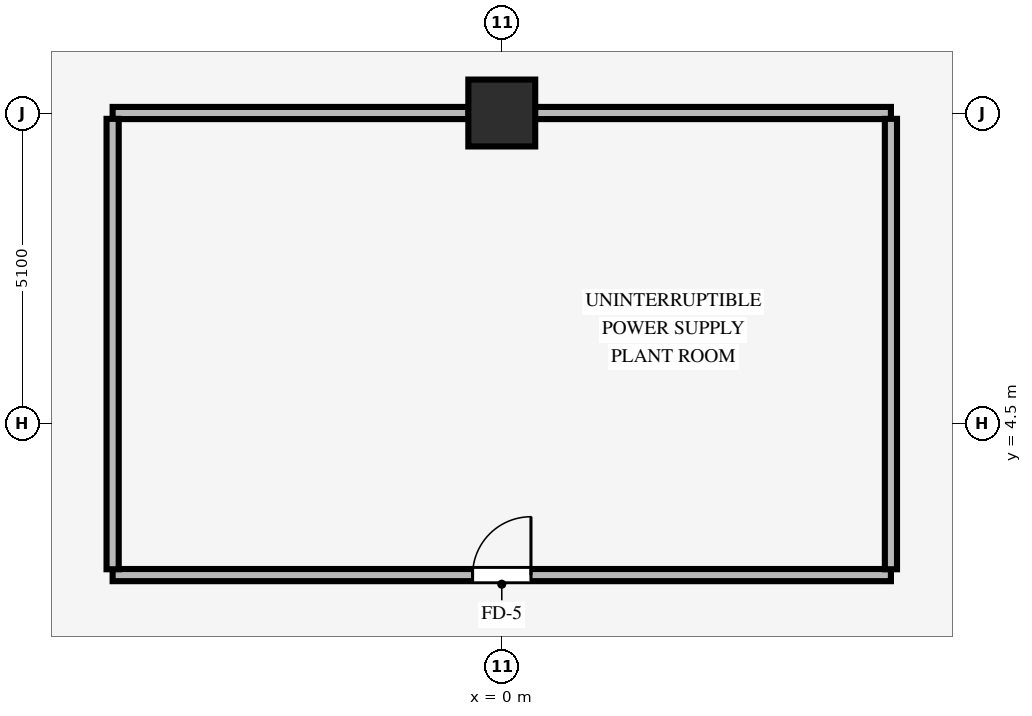
"""IFC4 building model, lengths in metres.
Left out: names, types, materials, properties, quantities, classifications, styles, units other than length and angle.
Written with IfcOpenShell. Run it as: python <this file> out.ifc"""

import sys

from ifc_helpers import new_model, si_unit, direction, frame, frame_2d, origin, origin_2d, place, context, subcontext, project, spatial, rectangle, extrude, source, transform, mapped, element, fill, save


model = new_model("IFC4")
c1 = context("Model", 3, precision=1e-05, world=origin(), true_north=direction((0.0, 1.0)))
c2 = subcontext(c1, "Body", "Model", "MODEL_VIEW")
j1 = project(units=[si_unit("LENGTHUNIT", "METRE"), si_unit("PLANEANGLEUNIT", "RADIAN")], contexts=[c1])
p1 = place(None, origin())
s1 = spatial("IfcSite", under=j1, at=p1, CompositionType="ELEMENT")
p2 = place(p1, origin())
s2 = spatial("IfcBuilding", under=s1, at=p2, CompositionType="ELEMENT")
p3 = place(p2, frame((0.0, 0.0, -4.2)))
s3 = spatial("IfcBuildingStorey", under=s2, at=p3, CompositionType="ELEMENT", Elevation=-4.2)
p4 = place(p3, frame((0.0, 9.6, 0.0), z_axis=(0.0, 0.0, 1.0), x_axis=(1.0, 0.0, 0.0)))
e1 = element("IfcColumn", 1, at=p4, inside=s3, PredefinedType="COLUMN", context=c2, shape_type="SweptSolid", body=[
    extrude(rectangle(XDim=1.1, YDim=1.1, at=origin_2d()), origin(), (0.0, 0.0, 1.0), 3.88),
])
p5 = place(p3, frame((-6.4, 2.0, 0.0), z_axis=(0.0, 0.0, 1.0), x_axis=(1.0, 0.0, 0.0)))
e2 = element("IfcWall", 2, at=p5, inside=s3, PredefinedType="STANDARD", context=c2, shape_type="SweptSolid", body=[
    extrude(rectangle(XDim=12.8, YDim=0.2, at=frame_2d((6.4, 0.0))), origin(), (0.0, 0.0, 1.0), 3.87),
])
p6 = place(p5, frame((5.92, 0.0, 0.0)))
e3 = element("IfcOpeningElement", 3, at=p6, cuts=e2, PredefinedType="OPENING", context=c2, shape_type="SweptSolid", body=[
    extrude(rectangle(XDim=0.96, YDim=2.1, at=frame_2d((0.48, 1.05))), frame((0.0, 0.11, 0.0), z_axis=(0.0, -1.0, 0.0), x_axis=(1.0, 0.0, 0.0)), (0.0, 0.0, 1.0), 0.22),
])
for number, where, z_axis, x_axis in (
    (4, (-6.4, 9.6, 0.0), (0.0, 0.0, 1.0), (1.0, 0.0, 0.0)),
    (5, (0.546, 9.6, 0.0), (0.0, 0.0, 1.0), (1.0, 0.0, 0.0)),
):
    element("IfcWall", number, at=place(p3, frame(where, z_axis=z_axis, x_axis=x_axis)), inside=s3, PredefinedType="STANDARD", context=c2, shape_type="SweptSolid", body=[
        extrude(rectangle(XDim=5.854, YDim=0.2, at=frame_2d((2.927, 0.0))), origin(), (0.0, 0.0, 1.0), 3.235),
    ])
for number, where, z_axis, x_axis in (
    (6, (-6.4, 2.096, 0.0), (0.0, 0.0, 1.0), (0.0, 1.0, 0.0)),
    (7, (6.4, 2.096, 0.0), (0.0, 0.0, 1.0), (0.0, 1.0, 0.0)),
):
    element("IfcWall", number, at=place(p3, frame(where, z_axis=z_axis, x_axis=x_axis)), inside=s3, PredefinedType="STANDARD", context=c2, shape_type="SweptSolid", body=[
        extrude(rectangle(XDim=7.408, YDim=0.2, at=frame_2d((3.704, 0.0))), origin(), (0.0, 0.0, 1.0), 3.87),
    ])
m1 = source(origin(), c2, "Body", "SweptSolid", [
    extrude(rectangle(XDim=0.96, YDim=2.1, at=frame_2d((0.48, 1.05))), frame((0.0, 0.025, 0.0), z_axis=(0.0, -1.0, 0.0), x_axis=(1.0, 0.0, 0.0)), (0.0, 0.0, 1.0), 0.05),
])
p7 = place(p6, origin())
e8 = element("IfcDoor", 8, at=p7, inside=s3, OperationType="SINGLE_SWING_RIGHT", PredefinedType="DOOR", context=c2, shape_type="MappedRepresentation", body=[
    mapped(m1, transform((0.0, 0.0, 0.0), scale=1.0)),
])
fill(e3, e8)
save(model, sys.argv[1])
